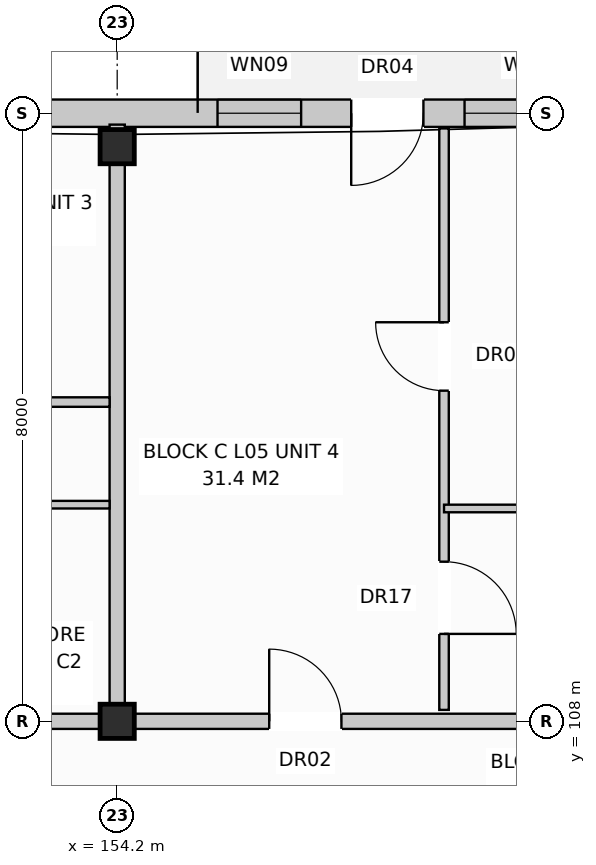
"""IFC4 building model, lengths in metres.
Left out: names, types, materials, properties, quantities, classifications, styles, units other than length and angle.
Written with IfcOpenShell. Run it as: python <this file> out.ifc"""

import sys

from ifc_helpers import new_model, si_unit, direction, frame, frame_2d, origin, origin_with_axes, origin_2d, place, context, subcontext, project, spatial, rectangle, extrude, element, fill, save


model = new_model("IFC4")
c1 = context("Model", 3, precision=1e-05, world=origin(), true_north=direction((0.0, 1.0)))
c2 = subcontext(c1, "Body", "Model", "MODEL_VIEW")
j1 = project(units=[si_unit("LENGTHUNIT", "METRE"), si_unit("PLANEANGLEUNIT", "RADIAN")], contexts=[c1])
p1 = place(None, origin())
s1 = spatial("IfcSite", under=j1, at=p1, CompositionType="ELEMENT")
p2 = place(p1, origin())
s2 = spatial("IfcBuilding", under=s1, at=p2, CompositionType="ELEMENT")
p3 = place(p2, frame((0.0, 0.0, 17.6)))
s3 = spatial("IfcBuildingStorey", under=s2, at=p3, CompositionType="ELEMENT", Elevation=17.6)
for number, where, z_axis, x_axis in (
    (1, (154.2, 108.0, 0.0), (0.0, 0.0, 1.0), (1.0, 0.0, 0.0)),
    (2, (154.2, 115.56, 0.0), (0.0, 0.0, 1.0), (1.0, 0.0, 0.0)),
):
    element("IfcColumn", number, at=place(p3, frame(where, z_axis=z_axis, x_axis=x_axis)), inside=s3, PredefinedType="COLUMN", context=c2, shape_type="SweptSolid", body=[
        extrude(rectangle(XDim=0.45, YDim=0.45, at=origin_2d()), origin(), (0.0, 0.0, 1.0), 3.2),
    ])
p4 = place(p3, frame((112.97, 116.0, 0.0), z_axis=(0.0, 0.0, 1.0), x_axis=(1.0, 0.0, 0.0)))
e3 = element("IfcWall", 3, at=p4, inside=s3, PredefinedType="STANDARD", context=c2, shape_type="SweptSolid", body=[
    extrude(rectangle(XDim=54.86, YDim=0.36, at=frame_2d((27.43, 0.0))), origin(), (0.0, 0.0, 1.0), 2.95),
])
p5 = place(p4, frame((4.891, 0.0, 0.0)))
e4 = element("IfcOpeningElement", 4, at=p5, cuts=e3, PredefinedType="OPENING", context=c2, shape_type="SweptSolid", body=[
    extrude(rectangle(XDim=0.95, YDim=2.1, at=frame_2d((0.475, 1.05))), frame((0.0, 0.192, 0.0), z_axis=(0.0, -1.0, 0.0), x_axis=(1.0, 0.0, 0.0)), (0.0, 0.0, 1.0), 0.384),
])
p6 = place(p4, frame((15.309, 0.0, 0.0)))
e5 = element("IfcOpeningElement", 5, at=p6, cuts=e3, PredefinedType="OPENING", context=c2, shape_type="SweptSolid", body=[
    extrude(rectangle(XDim=0.95, YDim=2.1, at=frame_2d((0.475, 1.05))), frame((0.0, 0.192, 0.0), z_axis=(0.0, -1.0, 0.0), x_axis=(1.0, 0.0, 0.0)), (0.0, 0.0, 1.0), 0.384),
])
p7 = place(p4, frame((31.409, 0.0, 0.0)))
e6 = element("IfcOpeningElement", 6, at=p7, cuts=e3, PredefinedType="OPENING", context=c2, shape_type="SweptSolid", body=[
    extrude(rectangle(XDim=0.95, YDim=2.1, at=frame_2d((0.475, 1.05))), frame((0.0, 0.192, 0.0), z_axis=(0.0, -1.0, 0.0), x_axis=(1.0, 0.0, 0.0)), (0.0, 0.0, 1.0), 0.384),
])
p8 = place(p4, frame((44.309, 0.0, 0.0)))
e7 = element("IfcOpeningElement", 7, at=p8, cuts=e3, PredefinedType="OPENING", context=c2, shape_type="SweptSolid", body=[
    extrude(rectangle(XDim=0.95, YDim=2.1, at=frame_2d((0.475, 1.05))), frame((0.0, 0.192, 0.0), z_axis=(0.0, -1.0, 0.0), x_axis=(1.0, 0.0, 0.0)), (0.0, 0.0, 1.0), 0.384),
])
p9 = place(p4, frame((2.025, 0.0, 0.8)))
e8 = element("IfcOpeningElement", 8, at=p9, cuts=e3, PredefinedType="OPENING", context=c2, shape_type="SweptSolid", body=[
    extrude(rectangle(XDim=1.95, YDim=1.65, at=frame_2d((0.975, 0.825))), frame((0.0, 0.192, 0.0), z_axis=(0.0, -1.0, 0.0), x_axis=(1.0, 0.0, 0.0)), (0.0, 0.0, 1.0), 0.384),
])
p10 = place(p4, frame((8.15, 0.0, 0.72)))
e9 = element("IfcOpeningElement", 9, at=p10, cuts=e3, PredefinedType="OPENING", context=c2, shape_type="SweptSolid", body=[
    extrude(rectangle(XDim=1.1, YDim=1.5, at=frame_2d((0.55, 0.75))), frame((0.0, 0.192, 0.0), z_axis=(0.0, -1.0, 0.0), x_axis=(1.0, 0.0, 0.0)), (0.0, 0.0, 1.0), 0.384),
])
p11 = place(p4, frame((11.675, 0.0, 0.85)))
e10 = element("IfcOpeningElement", 10, at=p11, cuts=e3, PredefinedType="OPENING", context=c2, shape_type="SweptSolid", body=[
    extrude(rectangle(XDim=1.35, YDim=1.6, at=frame_2d((0.675, 0.8))), frame((0.0, 0.192, 0.0), z_axis=(0.0, -1.0, 0.0), x_axis=(1.0, 0.0, 0.0)), (0.0, 0.0, 1.0), 0.384),
])
p12 = place(p4, frame((17.525, 0.0, 0.8)))
e11 = element("IfcOpeningElement", 11, at=p12, cuts=e3, PredefinedType="OPENING", context=c2, shape_type="SweptSolid", body=[
    extrude(rectangle(XDim=1.95, YDim=1.65, at=frame_2d((0.975, 0.825))), frame((0.0, 0.192, 0.0), z_axis=(0.0, -1.0, 0.0), x_axis=(1.0, 0.0, 0.0)), (0.0, 0.0, 1.0), 0.384),
])
p13 = place(p4, frame((21.6, 0.0, 0.8)))
e12 = element("IfcOpeningElement", 12, at=p13, cuts=e3, PredefinedType="OPENING", context=c2, shape_type="SweptSolid", body=[
    extrude(rectangle(XDim=1.8, YDim=1.7, at=frame_2d((0.9, 0.85))), frame((0.0, 0.192, 0.0), z_axis=(0.0, -1.0, 0.0), x_axis=(1.0, 0.0, 0.0)), (0.0, 0.0, 1.0), 0.384),
])
p14 = place(p4, frame((25.35, 0.0, 0.72)))
e13 = element("IfcOpeningElement", 13, at=p14, cuts=e3, PredefinedType="OPENING", context=c2, shape_type="SweptSolid", body=[
    extrude(rectangle(XDim=1.1, YDim=1.5, at=frame_2d((0.55, 0.75))), frame((0.0, 0.192, 0.0), z_axis=(0.0, -1.0, 0.0), x_axis=(1.0, 0.0, 0.0)), (0.0, 0.0, 1.0), 0.384),
])
p15 = place(p4, frame((29.125, 0.0, 0.8)))
e14 = element("IfcOpeningElement", 14, at=p15, cuts=e3, PredefinedType="OPENING", context=c2, shape_type="SweptSolid", body=[
    extrude(rectangle(XDim=1.95, YDim=1.65, at=frame_2d((0.975, 0.825))), frame((0.0, 0.192, 0.0), z_axis=(0.0, -1.0, 0.0), x_axis=(1.0, 0.0, 0.0)), (0.0, 0.0, 1.0), 0.384),
])
p16 = place(p4, frame((34.9, 0.0, 0.8)))
e15 = element("IfcOpeningElement", 15, at=p16, cuts=e3, PredefinedType="OPENING", context=c2, shape_type="SweptSolid", body=[
    extrude(rectangle(XDim=1.8, YDim=1.7, at=frame_2d((0.9, 0.85))), frame((0.0, 0.192, 0.0), z_axis=(0.0, -1.0, 0.0), x_axis=(1.0, 0.0, 0.0)), (0.0, 0.0, 1.0), 0.384),
])
p17 = place(p4, frame((38.45, 0.0, 0.72)))
e16 = element("IfcOpeningElement", 16, at=p17, cuts=e3, PredefinedType="OPENING", context=c2, shape_type="SweptSolid", body=[
    extrude(rectangle(XDim=1.1, YDim=1.5, at=frame_2d((0.55, 0.75))), frame((0.0, 0.192, 0.0), z_axis=(0.0, -1.0, 0.0), x_axis=(1.0, 0.0, 0.0)), (0.0, 0.0, 1.0), 0.384),
])
p18 = place(p4, frame((42.55, 0.0, 0.72)))
e17 = element("IfcOpeningElement", 17, at=p18, cuts=e3, PredefinedType="OPENING", context=c2, shape_type="SweptSolid", body=[
    extrude(rectangle(XDim=1.1, YDim=1.5, at=frame_2d((0.55, 0.75))), frame((0.0, 0.192, 0.0), z_axis=(0.0, -1.0, 0.0), x_axis=(1.0, 0.0, 0.0)), (0.0, 0.0, 1.0), 0.384),
])
p19 = place(p4, frame((45.8, 0.0, 0.8)))
e18 = element("IfcOpeningElement", 18, at=p19, cuts=e3, PredefinedType="OPENING", context=c2, shape_type="SweptSolid", body=[
    extrude(rectangle(XDim=1.8, YDim=1.7, at=frame_2d((0.9, 0.85))), frame((0.0, 0.192, 0.0), z_axis=(0.0, -1.0, 0.0), x_axis=(1.0, 0.0, 0.0)), (0.0, 0.0, 1.0), 0.384),
])
p20 = place(p4, frame((49.15, 0.0, 0.72)))
e19 = element("IfcOpeningElement", 19, at=p20, cuts=e3, PredefinedType="OPENING", context=c2, shape_type="SweptSolid", body=[
    extrude(rectangle(XDim=1.9, YDim=1.85, at=frame_2d((0.95, 0.925))), frame((0.0, 0.192, 0.0), z_axis=(0.0, -1.0, 0.0), x_axis=(1.0, 0.0, 0.0)), (0.0, 0.0, 1.0), 0.384),
])
p21 = place(p4, frame((52.95, 0.0, 0.72)))
e20 = element("IfcOpeningElement", 20, at=p21, cuts=e3, PredefinedType="OPENING", context=c2, shape_type="SweptSolid", body=[
    extrude(rectangle(XDim=1.1, YDim=1.5, at=frame_2d((0.55, 0.75))), frame((0.0, 0.192, 0.0), z_axis=(0.0, -1.0, 0.0), x_axis=(1.0, 0.0, 0.0)), (0.0, 0.0, 1.0), 0.384),
])
p22 = place(p3, frame((154.2, 108.15, 0.0), z_axis=(0.0, 0.0, 1.0), x_axis=(0.0, 1.0, 0.0)))
e21 = element("IfcWall", 21, at=p22, inside=s3, PredefinedType="PARTITIONING", context=c2, shape_type="SweptSolid", body=[
    extrude(rectangle(XDim=7.7, YDim=0.2, at=frame_2d((3.85, 0.0))), origin(), (0.0, 0.0, 1.0), 2.95),
])
p23 = place(p3, frame((140.4, 108.0, 0.0), z_axis=(0.0, 0.0, 1.0), x_axis=(1.0, 0.0, 0.0)))
e22 = element("IfcWall", 22, at=p23, inside=s3, PredefinedType="PARTITIONING", context=c2, shape_type="SweptSolid", body=[
    extrude(rectangle(XDim=13.8, YDim=0.2, at=frame_2d((6.9, 0.0))), origin(), (0.0, 0.0, 1.0), 2.39),
])
p24 = place(p23, frame((2.4, 0.0, 0.0)))
e23 = element("IfcOpeningElement", 23, at=p24, cuts=e22, PredefinedType="OPENING", context=c2, shape_type="SweptSolid", body=[
    extrude(rectangle(XDim=0.95, YDim=2.15, at=frame_2d((0.475, 1.075))), frame((0.0, 0.112, 0.0), z_axis=(0.0, -1.0, 0.0), x_axis=(1.0, 0.0, 0.0)), (0.0, 0.0, 1.0), 0.224),
])
p25 = place(p3, frame((145.6, 110.85, 0.0), z_axis=(0.0, 0.0, 1.0), x_axis=(1.0, 0.0, 0.0)))
e24 = element("IfcWall", 24, at=p25, inside=s3, PredefinedType="PARTITIONING", context=c2, shape_type="SweptSolid", body=[
    extrude(rectangle(XDim=8.5, YDim=0.1, at=frame_2d((4.25, 0.0))), origin(), (0.0, 0.0, 1.0), 2.95),
])
p26 = place(p25, frame((1.0, 0.0, 0.0)))
e25 = element("IfcOpeningElement", 25, at=p26, cuts=e24, PredefinedType="OPENING", context=c2, shape_type="SweptSolid", body=[
    extrude(rectangle(XDim=0.85, YDim=2.1, at=frame_2d((0.425, 1.05))), frame((0.0, 0.062, 0.0), z_axis=(0.0, -1.0, 0.0), x_axis=(1.0, 0.0, 0.0)), (0.0, 0.0, 1.0), 0.124),
])
p27 = place(p25, frame((3.4, 0.0, 0.0)))
e26 = element("IfcOpeningElement", 26, at=p27, cuts=e24, PredefinedType="OPENING", context=c2, shape_type="SweptSolid", body=[
    extrude(rectangle(XDim=0.85, YDim=2.05, at=frame_2d((0.425, 1.025))), frame((0.0, 0.062, 0.0), z_axis=(0.0, -1.0, 0.0), x_axis=(1.0, 0.0, 0.0)), (0.0, 0.0, 1.0), 0.124),
])
p28 = place(p25, frame((6.2, 0.0, 0.0)))
e27 = element("IfcOpeningElement", 27, at=p28, cuts=e24, PredefinedType="OPENING", context=c2, shape_type="SweptSolid", body=[
    extrude(rectangle(XDim=0.85, YDim=2.05, at=frame_2d((0.425, 1.025))), frame((0.0, 0.062, 0.0), z_axis=(0.0, -1.0, 0.0), x_axis=(1.0, 0.0, 0.0)), (0.0, 0.0, 1.0), 0.124),
])
p29 = place(p3, frame((145.6, 112.2, 0.0), z_axis=(0.0, 0.0, 1.0), x_axis=(1.0, 0.0, 0.0)))
e28 = element("IfcWall", 28, at=p29, inside=s3, PredefinedType="PARTITIONING", context=c2, shape_type="SweptSolid", body=[
    extrude(rectangle(XDim=8.5, YDim=0.125, at=frame_2d((4.25, 0.0))), origin(), (0.0, 0.0, 1.0), 2.95),
])
p30 = place(p29, frame((1.5, 0.0, 0.0)))
e29 = element("IfcOpeningElement", 29, at=p30, cuts=e28, PredefinedType="OPENING", context=c2, shape_type="SweptSolid", body=[
    extrude(rectangle(XDim=0.9, YDim=2.1, at=frame_2d((0.45, 1.05))), frame((0.0, 0.074, 0.0), z_axis=(0.0, -1.0, 0.0), x_axis=(1.0, 0.0, 0.0)), (0.0, 0.0, 1.0), 0.149),
])
p31 = place(p29, frame((5.6, 0.0, 0.0)))
e30 = element("IfcOpeningElement", 30, at=p31, cuts=e28, PredefinedType="OPENING", context=c2, shape_type="SweptSolid", body=[
    extrude(rectangle(XDim=0.9, YDim=2.1, at=frame_2d((0.45, 1.05))), frame((0.0, 0.074, 0.0), z_axis=(0.0, -1.0, 0.0), x_axis=(1.0, 0.0, 0.0)), (0.0, 0.0, 1.0), 0.149),
])
p32 = place(p3, frame((154.2, 108.0, 0.0), z_axis=(0.0, 0.0, 1.0), x_axis=(1.0, 0.0, 0.0)))
e31 = element("IfcWall", 31, at=p32, inside=s3, PredefinedType="PARTITIONING", context=c2, shape_type="SweptSolid", body=[
    extrude(rectangle(XDim=6.9, YDim=0.2, at=frame_2d((3.45, 0.0))), origin(), (0.0, 0.0, 1.0), 2.39),
])
p33 = place(p32, frame((2.0, 0.0, 0.0)))
e32 = element("IfcOpeningElement", 32, at=p33, cuts=e31, PredefinedType="OPENING", context=c2, shape_type="SweptSolid", body=[
    extrude(rectangle(XDim=0.95, YDim=2.15, at=frame_2d((0.475, 1.075))), frame((0.0, 0.112, 0.0), z_axis=(0.0, -1.0, 0.0), x_axis=(1.0, 0.0, 0.0)), (0.0, 0.0, 1.0), 0.224),
])
p34 = place(p3, frame((158.5, 108.15, 0.0), z_axis=(0.0, 0.0, 1.0), x_axis=(0.0, 1.0, 0.0)))
e33 = element("IfcWall", 33, at=p34, inside=s3, PredefinedType="PARTITIONING", context=c2, shape_type="SweptSolid", body=[
    extrude(rectangle(XDim=7.65, YDim=0.125, at=frame_2d((3.825, 0.0))), origin(), (0.0, 0.0, 1.0), 2.95),
])
p35 = place(p34, frame((1.0, 0.0, 0.0)))
e34 = element("IfcOpeningElement", 34, at=p35, cuts=e33, PredefinedType="OPENING", context=c2, shape_type="SweptSolid", body=[
    extrude(rectangle(XDim=0.95, YDim=2.1, at=frame_2d((0.475, 1.05))), frame((0.0, 0.074, 0.0), z_axis=(0.0, -1.0, 0.0), x_axis=(1.0, 0.0, 0.0)), (0.0, 0.0, 1.0), 0.149),
])
p36 = place(p34, frame((4.2, 0.0, 0.0)))
e35 = element("IfcOpeningElement", 35, at=p36, cuts=e33, PredefinedType="OPENING", context=c2, shape_type="SweptSolid", body=[
    extrude(rectangle(XDim=0.9, YDim=2.1, at=frame_2d((0.45, 1.05))), frame((0.0, 0.074, 0.0), z_axis=(0.0, -1.0, 0.0), x_axis=(1.0, 0.0, 0.0)), (0.0, 0.0, 1.0), 0.149),
])
p37 = place(p3, frame((158.5, 110.8, 0.0), z_axis=(0.0, 0.0, 1.0), x_axis=(1.0, 0.0, 0.0)))
e36 = element("IfcWall", 36, at=p37, inside=s3, PredefinedType="PARTITIONING", context=c2, shape_type="SweptSolid", body=[
    extrude(rectangle(XDim=2.5, YDim=0.1, at=frame_2d((1.25, 0.0))), origin(), (0.0, 0.0, 1.0), 2.95),
])
p38 = place(p8, frame((0.95, 0.0, 0.0), z_axis=(0.0, 0.0, 1.0), x_axis=(-1.0, 0.0, 0.0)))
e37 = element("IfcDoor", 37, at=p38, inside=s3, OperationType="SINGLE_SWING_LEFT", PredefinedType="DOOR", context=c2, shape_type="SweptSolid", body=[
    extrude(rectangle(XDim=0.95, YDim=2.1, at=frame_2d((0.475, 1.05))), frame((0.0, 0.025, 0.0), z_axis=(0.0, -1.0, 0.0), x_axis=(1.0, 0.0, 0.0)), (0.0, 0.0, 1.0), 0.05),
])
fill(e7, e37)
p39 = place(p18, origin_with_axes())
e38 = element("IfcWindow", 38, at=p39, inside=s3, PartitioningType="SINGLE_PANEL", PredefinedType="WINDOW", context=c2, shape_type="SweptSolid", body=[
    extrude(rectangle(XDim=1.1, YDim=1.5, at=frame_2d((0.55, 0.75))), frame((0.0, 0.03, 0.0), z_axis=(0.0, -1.0, 0.0), x_axis=(1.0, 0.0, 0.0)), (0.0, 0.0, 1.0), 0.06),
])
fill(e17, e38)
p40 = place(p19, origin_with_axes())
e39 = element("IfcWindow", 39, at=p40, inside=s3, PartitioningType="SINGLE_PANEL", PredefinedType="WINDOW", context=c2, shape_type="SweptSolid", body=[
    extrude(rectangle(XDim=1.8, YDim=1.7, at=frame_2d((0.9, 0.85))), frame((0.0, 0.03, 0.0), z_axis=(0.0, -1.0, 0.0), x_axis=(1.0, 0.0, 0.0)), (0.0, 0.0, 1.0), 0.06),
])
fill(e18, e39)
p41 = place(p33, origin_with_axes())
e40 = element("IfcDoor", 40, at=p41, inside=s3, OperationType="SINGLE_SWING_LEFT", PredefinedType="DOOR", context=c2, shape_type="SweptSolid", body=[
    extrude(rectangle(XDim=0.95, YDim=2.15, at=frame_2d((0.475, 1.075))), frame((0.0, 0.025, 0.0), z_axis=(0.0, -1.0, 0.0), x_axis=(1.0, 0.0, 0.0)), (0.0, 0.0, 1.0), 0.05),
])
fill(e32, e40)
p42 = place(p35, frame((0.95, 0.0, 0.0), z_axis=(0.0, 0.0, 1.0), x_axis=(-1.0, 0.0, 0.0)))
e41 = element("IfcDoor", 41, at=p42, inside=s3, OperationType="SINGLE_SWING_LEFT", PredefinedType="DOOR", context=c2, shape_type="SweptSolid", body=[
    extrude(rectangle(XDim=0.95, YDim=2.1, at=frame_2d((0.475, 1.05))), frame((0.0, 0.025, 0.0), z_axis=(0.0, -1.0, 0.0), x_axis=(1.0, 0.0, 0.0)), (0.0, 0.0, 1.0), 0.05),
])
fill(e34, e41)
p43 = place(p36, origin_with_axes())
e42 = element("IfcDoor", 42, at=p43, inside=s3, OperationType="SINGLE_SWING_RIGHT", PredefinedType="DOOR", context=c2, shape_type="SweptSolid", body=[
    extrude(rectangle(XDim=0.9, YDim=2.1, at=frame_2d((0.45, 1.05))), frame((0.0, 0.025, 0.0), z_axis=(0.0, -1.0, 0.0), x_axis=(1.0, 0.0, 0.0)), (0.0, 0.0, 1.0), 0.05),
])
fill(e35, e42)
save(model, sys.argv[1])
